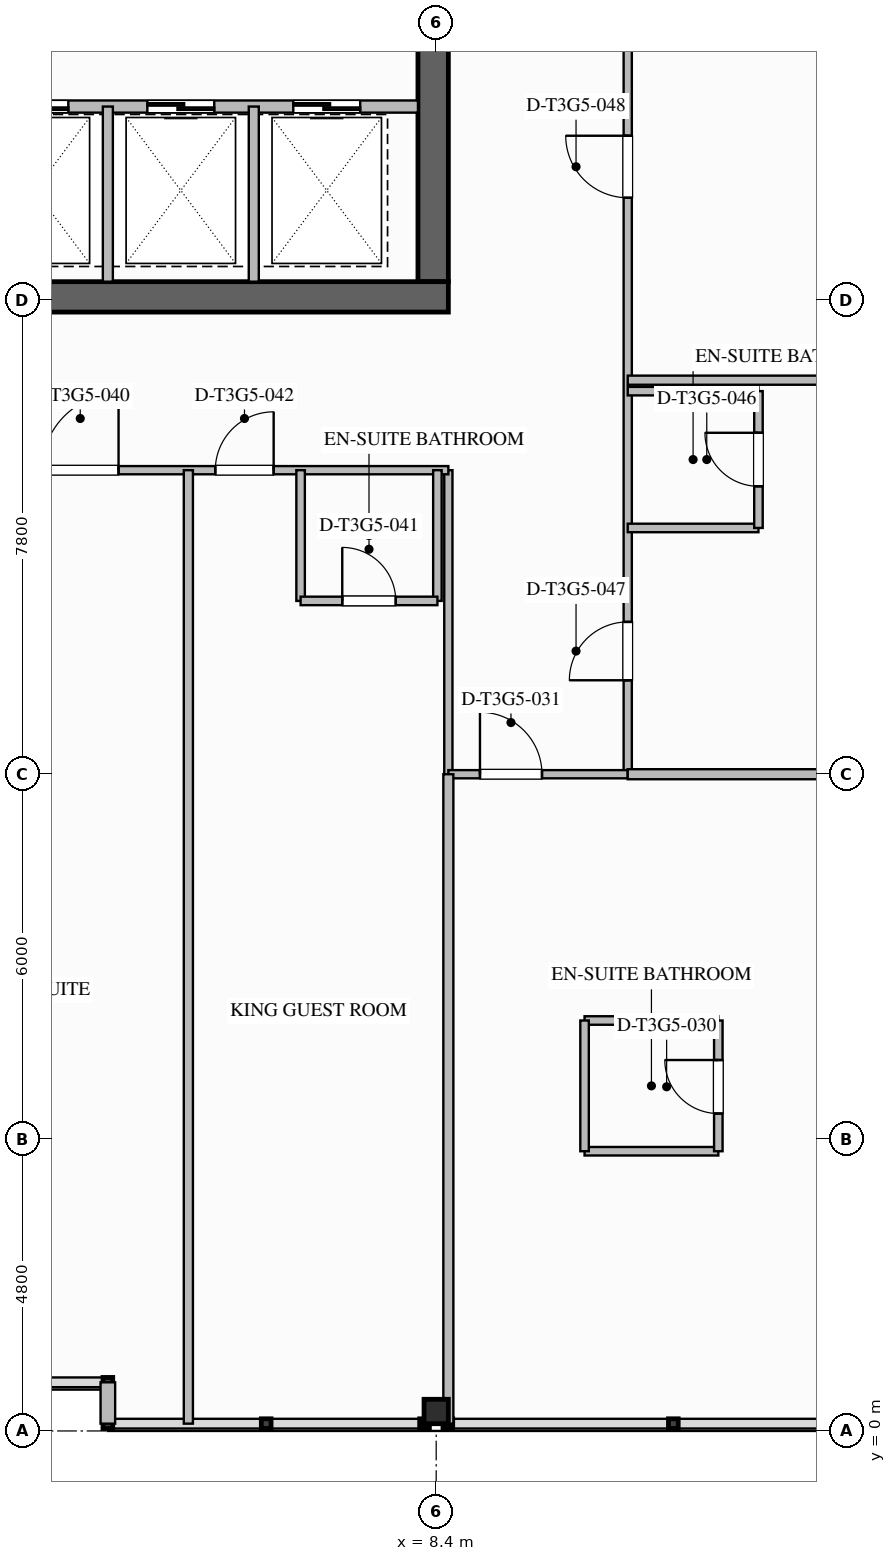
"""IFC4 building model, lengths in metres.
Left out: names, types, materials, properties, quantities, classifications, styles, units other than length and angle.
Written with IfcOpenShell. Run it as: python <this file> out.ifc"""

import sys

from ifc_helpers import new_model, si_unit, direction, frame, frame_2d, origin, origin_2d, place, context, subcontext, project, spatial, rectangle, i_section, extrude, element, fill, save


model = new_model("IFC4")
c1 = context("Model", 3, precision=1e-05, world=origin(), true_north=direction((0.0, 1.0)))
c2 = subcontext(c1, "Body", "Model", "MODEL_VIEW")
j1 = project(units=[si_unit("LENGTHUNIT", "METRE"), si_unit("PLANEANGLEUNIT", "RADIAN")], contexts=[c1])
p1 = place(None, origin())
s1 = spatial("IfcSite", under=j1, at=p1, CompositionType="ELEMENT")
p2 = place(p1, origin())
s2 = spatial("IfcBuilding", under=s1, at=p2, CompositionType="ELEMENT")
p3 = place(p2, frame((0.0, 0.0, 193.0)))
s3 = spatial("IfcBuildingStorey", under=s2, at=p3, CompositionType="ELEMENT", Elevation=193.0)
p4 = place(p3, frame((8.35, 35.1, 0.0), z_axis=(0.0, 0.0, 1.0), x_axis=(0.0, -1.0, 0.0)))
e1 = element("IfcWall", 1, at=p4, inside=s3, PredefinedType="SHEAR", context=c2, shape_type="SweptSolid", body=[
    extrude(rectangle(XDim=16.2, YDim=0.5, at=frame_2d((8.1, 0.0))), origin(), (0.0, 0.0, 1.0), 3.55),
])
p5 = place(p4, frame((3.08, 0.0, 0.0)))
e2 = element("IfcOpeningElement", 2, at=p5, cuts=e1, PredefinedType="OPENING", context=c2, shape_type="SweptSolid", body=[
    extrude(rectangle(XDim=1.12, YDim=2.1, at=frame_2d((0.56, 1.05))), frame((0.0, 0.26, 0.0), z_axis=(0.0, -1.0, 0.0), x_axis=(1.0, 0.0, 0.0)), (0.0, 0.0, 1.0), 0.52),
])
p6 = place(p4, frame((10.62, 0.0, 0.0)))
e3 = element("IfcOpeningElement", 3, at=p6, cuts=e1, PredefinedType="OPENING", context=c2, shape_type="SweptSolid", body=[
    extrude(rectangle(XDim=1.08, YDim=2.04, at=frame_2d((0.54, 1.02))), frame((0.0, 0.26, 0.0), z_axis=(0.0, -1.0, 0.0), x_axis=(1.0, 0.0, 0.0)), (0.0, 0.0, 1.0), 0.52),
])
p7 = place(p3, frame((8.6, 18.65, 0.0), z_axis=(0.0, 0.0, 1.0), x_axis=(-1.0, 0.0, 0.0)))
e4 = element("IfcWall", 4, at=p7, inside=s3, PredefinedType="SHEAR", context=c2, shape_type="SweptSolid", body=[
    extrude(rectangle(XDim=17.2, YDim=0.5, at=frame_2d((8.6, 0.0))), origin(), (0.0, 0.0, 1.0), 3.55),
])
p8 = place(p3, frame((8.4, 0.32, 0.0), z_axis=(0.0, 0.0, 1.0), x_axis=(0.0, 1.0, 0.0)))
e5 = element("IfcColumn", 5, at=p8, inside=s3, PredefinedType="COLUMN", context=c2, shape_type="SweptSolid", body=[
    extrude(i_section(OverallWidth=0.401, OverallDepth=0.399, WebThickness=0.025, FlangeThickness=0.04, FilletRadius=0.025, at=origin_2d()), origin(), (0.0, 0.0, 1.0), 3.547),
])
p9 = place(p3, frame((3.0, 0.12, 0.0), z_axis=(0.0, 0.0, 1.0), x_axis=(0.0, 1.0, 0.0)))
e6 = element("IfcWall", 6, at=p9, inside=s3, PredefinedType="STANDARD", context=c2, shape_type="SweptSolid", body=[
    extrude(rectangle(XDim=0.68, YDim=0.24, at=frame_2d((0.34, 0.0))), origin(), (0.0, 0.0, 1.0), 3.29),
])
p10 = place(p3, frame((8.1, 21.78, 0.0), z_axis=(0.0, 0.0, 1.0), x_axis=(-1.0, 0.0, 0.0)))
e7 = element("IfcWall", 7, at=p10, inside=s3, PredefinedType="SOLIDWALL", context=c2, shape_type="SweptSolid", body=[
    extrude(rectangle(XDim=7.55, YDim=0.2, at=frame_2d((3.775, 0.0))), origin(), (0.0, 0.0, 1.0), 3.29),
])
p11 = place(p10, frame((5.75, 0.0, 0.0)))
e8 = element("IfcOpeningElement", 8, at=p11, cuts=e7, PredefinedType="OPENING", context=c2, shape_type="SweptSolid", body=[
    extrude(rectangle(XDim=1.1, YDim=2.2, at=frame_2d((0.55, 1.1))), frame((0.0, 0.11, 0.0), z_axis=(0.0, -1.0, 0.0), x_axis=(1.0, 0.0, 0.0)), (0.0, 0.0, 1.0), 0.22),
])
p12 = place(p10, frame((3.35, 0.0, 0.0)))
e9 = element("IfcOpeningElement", 9, at=p12, cuts=e7, PredefinedType="OPENING", context=c2, shape_type="SweptSolid", body=[
    extrude(rectangle(XDim=1.1, YDim=2.2, at=frame_2d((0.55, 1.1))), frame((0.0, 0.11, 0.0), z_axis=(0.0, -1.0, 0.0), x_axis=(1.0, 0.0, 0.0)), (0.0, 0.0, 1.0), 0.22),
])
p13 = place(p10, frame((0.95, 0.0, 0.0)))
e10 = element("IfcOpeningElement", 10, at=p13, cuts=e7, PredefinedType="OPENING", context=c2, shape_type="SweptSolid", body=[
    extrude(rectangle(XDim=1.1, YDim=2.2, at=frame_2d((0.55, 1.1))), frame((0.0, 0.11, 0.0), z_axis=(0.0, -1.0, 0.0), x_axis=(1.0, 0.0, 0.0)), (0.0, 0.0, 1.0), 0.22),
])
for number, where, z_axis, x_axis in (
    (11, (3.0, 18.9, 0.0), (0.0, 0.0, 1.0), (0.0, 1.0, 0.0)),
    (12, (5.4, 18.9, 0.0), (0.0, 0.0, 1.0), (0.0, 1.0, 0.0)),
):
    element("IfcWall", number, at=place(p3, frame(where, z_axis=z_axis, x_axis=x_axis)), inside=s3, PredefinedType="PARTITIONING", context=c2, shape_type="SweptSolid", body=[
        extrude(rectangle(XDim=2.88, YDim=0.165, at=frame_2d((1.44, 0.0))), origin(), (0.0, 0.0, 1.0), 3.29),
    ])
p14 = place(p3, frame((8.6, 10.8, 0.0), z_axis=(0.0, 0.0, 1.0), x_axis=(0.0, 1.0, 0.0)))
e13 = element("IfcWall", 13, at=p14, inside=s3, PredefinedType="PARTITIONING", context=c2, shape_type="SweptSolid", body=[
    extrude(rectangle(XDim=5.0, YDim=0.135, at=frame_2d((2.5, 0.0))), origin(), (0.0, 0.0, 1.0), 2.667),
])
p15 = place(p3, frame((-16.2, 15.8, 0.0), z_axis=(0.0, 0.0, 1.0), x_axis=(1.0, 0.0, 0.0)))
e14 = element("IfcWall", 14, at=p15, inside=s3, PredefinedType="PARTITIONING", context=c2, shape_type="SweptSolid", body=[
    extrude(rectangle(XDim=24.8, YDim=0.135, at=frame_2d((12.4, 0.0))), origin(), (0.0, 0.0, 1.0), 3.29),
])
p16 = place(p15, frame((0.355, 0.0, 0.0)))
e15 = element("IfcOpeningElement", 15, at=p16, cuts=e14, PredefinedType="OPENING", context=c2, shape_type="SweptSolid", body=[
    extrude(rectangle(XDim=0.96, YDim=2.15, at=frame_2d((0.48, 1.075))), frame((0.0, 0.077, 0.0), z_axis=(0.0, -1.0, 0.0), x_axis=(1.0, 0.0, 0.0)), (0.0, 0.0, 1.0), 0.155),
])
p17 = place(p15, frame((7.766, 0.0, 0.0)))
e16 = element("IfcOpeningElement", 16, at=p17, cuts=e14, PredefinedType="OPENING", context=c2, shape_type="SweptSolid", body=[
    extrude(rectangle(XDim=1.26, YDim=2.2, at=frame_2d((0.63, 1.1))), frame((0.0, 0.077, 0.0), z_axis=(0.0, -1.0, 0.0), x_axis=(1.0, 0.0, 0.0)), (0.0, 0.0, 1.0), 0.155),
])
p18 = place(p15, frame((11.89, 0.0, 0.0)))
e17 = element("IfcOpeningElement", 17, at=p18, cuts=e14, PredefinedType="OPENING", context=c2, shape_type="SweptSolid", body=[
    extrude(rectangle(XDim=1.02, YDim=2.15, at=frame_2d((0.51, 1.075))), frame((0.0, 0.077, 0.0), z_axis=(0.0, -1.0, 0.0), x_axis=(1.0, 0.0, 0.0)), (0.0, 0.0, 1.0), 0.155),
])
p19 = place(p15, frame((18.116, 0.0, 0.0)))
e18 = element("IfcOpeningElement", 18, at=p19, cuts=e14, PredefinedType="OPENING", context=c2, shape_type="SweptSolid", body=[
    extrude(rectangle(XDim=1.26, YDim=2.2, at=frame_2d((0.63, 1.1))), frame((0.0, 0.077, 0.0), z_axis=(0.0, -1.0, 0.0), x_axis=(1.0, 0.0, 0.0)), (0.0, 0.0, 1.0), 0.155),
])
p20 = place(p15, frame((20.967, 0.0, 0.0)))
e19 = element("IfcOpeningElement", 19, at=p20, cuts=e14, PredefinedType="OPENING", context=c2, shape_type="SweptSolid", body=[
    extrude(rectangle(XDim=0.96, YDim=2.15, at=frame_2d((0.48, 1.075))), frame((0.0, 0.077, 0.0), z_axis=(0.0, -1.0, 0.0), x_axis=(1.0, 0.0, 0.0)), (0.0, 0.0, 1.0), 0.155),
])
p21 = place(p3, frame((11.55, 10.8, 0.0), z_axis=(0.0, 0.0, 1.0), x_axis=(0.0, 1.0, 0.0)))
e20 = element("IfcWall", 20, at=p21, inside=s3, PredefinedType="PARTITIONING", context=c2, shape_type="SweptSolid", body=[
    extrude(rectangle(XDim=32.4, YDim=0.135, at=frame_2d((16.2, 0.0))), origin(), (0.0, 0.0, 1.0), 3.29),
])
p22 = place(p21, frame((1.545, 0.0, 0.0)))
e21 = element("IfcOpeningElement", 21, at=p22, cuts=e20, PredefinedType="OPENING", context=c2, shape_type="SweptSolid", body=[
    extrude(rectangle(XDim=0.96, YDim=2.15, at=frame_2d((0.48, 1.075))), frame((0.0, 0.077, 0.0), z_axis=(0.0, -1.0, 0.0), x_axis=(1.0, 0.0, 0.0)), (0.0, 0.0, 1.0), 0.155),
])
p23 = place(p21, frame((9.48, 0.0, 0.0)))
e22 = element("IfcOpeningElement", 22, at=p23, cuts=e20, PredefinedType="OPENING", context=c2, shape_type="SweptSolid", body=[
    extrude(rectangle(XDim=1.02, YDim=2.15, at=frame_2d((0.51, 1.075))), frame((0.0, 0.077, 0.0), z_axis=(0.0, -1.0, 0.0), x_axis=(1.0, 0.0, 0.0)), (0.0, 0.0, 1.0), 0.155),
])
p24 = place(p21, frame((14.445, 0.0, 0.0)))
e23 = element("IfcOpeningElement", 23, at=p24, cuts=e20, PredefinedType="OPENING", context=c2, shape_type="SweptSolid", body=[
    extrude(rectangle(XDim=0.96, YDim=2.15, at=frame_2d((0.48, 1.075))), frame((0.0, 0.077, 0.0), z_axis=(0.0, -1.0, 0.0), x_axis=(1.0, 0.0, 0.0)), (0.0, 0.0, 1.0), 0.155),
])
p25 = place(p21, frame((21.3, 0.0, 0.0)))
e24 = element("IfcOpeningElement", 24, at=p25, cuts=e20, PredefinedType="OPENING", context=c2, shape_type="SweptSolid", body=[
    extrude(rectangle(XDim=1.02, YDim=2.15, at=frame_2d((0.51, 1.075))), frame((0.0, 0.077, 0.0), z_axis=(0.0, -1.0, 0.0), x_axis=(1.0, 0.0, 0.0)), (0.0, 0.0, 1.0), 0.155),
])
p26 = place(p21, frame((26.925, 0.0, 0.0)))
e25 = element("IfcOpeningElement", 25, at=p26, cuts=e20, PredefinedType="OPENING", context=c2, shape_type="SweptSolid", body=[
    extrude(rectangle(XDim=0.96, YDim=2.15, at=frame_2d((0.48, 1.075))), frame((0.0, 0.077, 0.0), z_axis=(0.0, -1.0, 0.0), x_axis=(1.0, 0.0, 0.0)), (0.0, 0.0, 1.0), 0.155),
])
p27 = place(p3, frame((8.6, 10.8, 0.0), z_axis=(0.0, 0.0, 1.0), x_axis=(1.0, 0.0, 0.0)))
e26 = element("IfcWall", 26, at=p27, inside=s3, PredefinedType="PARTITIONING", context=c2, shape_type="SweptSolid", body=[
    extrude(rectangle(XDim=2.95, YDim=0.135, at=frame_2d((1.475, 0.0))), origin(), (0.0, 0.0, 1.0), 2.58),
])
p28 = place(p27, frame((0.52, 0.0, 0.0)))
e27 = element("IfcOpeningElement", 27, at=p28, cuts=e26, PredefinedType="OPENING", context=c2, shape_type="SweptSolid", body=[
    extrude(rectangle(XDim=1.02, YDim=2.15, at=frame_2d((0.51, 1.075))), frame((0.0, 0.077, 0.0), z_axis=(0.0, -1.0, 0.0), x_axis=(1.0, 0.0, 0.0)), (0.0, 0.0, 1.0), 0.155),
])
p29 = place(p3, frame((8.6, 0.12, 0.0), z_axis=(0.0, 0.0, 1.0), x_axis=(0.0, 1.0, 0.0)))
e28 = element("IfcWall", 28, at=p29, inside=s3, PredefinedType="PARTITIONING", context=c2, shape_type="SweptSolid", body=[
    extrude(rectangle(XDim=10.68, YDim=0.165, at=frame_2d((5.34, 0.0))), origin(), (0.0, 0.0, 1.0), 2.58),
])
p30 = place(p3, frame((11.55, 10.8, 0.0), z_axis=(0.0, 0.0, 1.0), x_axis=(1.0, 0.0, 0.0)))
e29 = element("IfcWall", 29, at=p30, inside=s3, PredefinedType="PARTITIONING", context=c2, shape_type="SweptSolid", body=[
    extrude(rectangle(XDim=10.53, YDim=0.165, at=frame_2d((5.265, 0.0))), origin(), (0.0, 0.0, 1.0), 2.58),
])
for number, where, z_axis, x_axis in (
    (30, (10.84, 4.6, 0.0), (0.0, 0.0, 1.0), (1.0, 0.0, 0.0)),
    (31, (10.84, 6.75, 0.0), (0.0, 0.0, 1.0), (1.0, 0.0, 0.0)),
):
    element("IfcWall", number, at=place(p3, frame(where, z_axis=z_axis, x_axis=x_axis)), inside=s3, PredefinedType="PLUMBINGWALL", context=c2, shape_type="SweptSolid", body=[
        extrude(rectangle(XDim=2.2, YDim=0.14, at=frame_2d((1.1, 0.0))), origin(), (0.0, 0.0, 1.0), 3.29),
    ])
p31 = place(p3, frame((10.84, 4.6, 0.0), z_axis=(0.0, 0.0, 1.0), x_axis=(0.0, 1.0, 0.0)))
e32 = element("IfcWall", 32, at=p31, inside=s3, PredefinedType="PLUMBINGWALL", context=c2, shape_type="SweptSolid", body=[
    extrude(rectangle(XDim=2.15, YDim=0.14, at=frame_2d((1.075, 0.0))), origin(), (0.0, 0.0, 1.0), 3.29),
])
p32 = place(p3, frame((13.04, 4.6, 0.0), z_axis=(0.0, 0.0, 1.0), x_axis=(0.0, 1.0, 0.0)))
e33 = element("IfcWall", 33, at=p32, inside=s3, PredefinedType="PLUMBINGWALL", context=c2, shape_type="SweptSolid", body=[
    extrude(rectangle(XDim=2.15, YDim=0.14, at=frame_2d((1.075, 0.0))), origin(), (0.0, 0.0, 1.0), 3.29),
])
p33 = place(p32, frame((0.62, 0.0, 0.0)))
e34 = element("IfcOpeningElement", 34, at=p33, cuts=e33, PredefinedType="OPENING", context=c2, shape_type="SweptSolid", body=[
    extrude(rectangle(XDim=0.88, YDim=2.1, at=frame_2d((0.44, 1.05))), frame((0.0, 0.08, 0.0), z_axis=(0.0, -1.0, 0.0), x_axis=(1.0, 0.0, 0.0)), (0.0, 0.0, 1.0), 0.16),
])
p34 = place(p3, frame((4.324, 0.12, 0.0), z_axis=(0.0, 0.0, 1.0), x_axis=(0.0, 1.0, 0.0)))
e35 = element("IfcWall", 35, at=p34, inside=s3, PredefinedType="PARTITIONING", context=c2, shape_type="SweptSolid", body=[
    extrude(rectangle(XDim=15.68, YDim=0.15, at=frame_2d((7.84, 0.0))), origin(), (0.0, 0.0, 1.0), 3.29),
])
p35 = place(p3, frame((6.17, 15.8, 0.0), z_axis=(0.0, 0.0, 1.0), x_axis=(0.0, -1.0, 0.0)))
e36 = element("IfcWall", 36, at=p35, inside=s3, PredefinedType="PLUMBINGWALL", context=c2, shape_type="SweptSolid", body=[
    extrude(rectangle(XDim=2.15, YDim=0.14, at=frame_2d((1.075, 0.0))), origin(), (0.0, 0.0, 1.0), 3.29),
])
p36 = place(p3, frame((8.42, 15.8, 0.0), z_axis=(0.0, 0.0, 1.0), x_axis=(0.0, -1.0, 0.0)))
e37 = element("IfcWall", 37, at=p36, inside=s3, PredefinedType="PLUMBINGWALL", context=c2, shape_type="SweptSolid", body=[
    extrude(rectangle(XDim=2.15, YDim=0.14, at=frame_2d((1.075, 0.0))), origin(), (0.0, 0.0, 1.0), 2.667),
])
p37 = place(p3, frame((6.17, 13.65, 0.0), z_axis=(0.0, 0.0, 1.0), x_axis=(1.0, 0.0, 0.0)))
e38 = element("IfcWall", 38, at=p37, inside=s3, PredefinedType="PLUMBINGWALL", context=c2, shape_type="SweptSolid", body=[
    extrude(rectangle(XDim=2.25, YDim=0.14, at=frame_2d((1.125, 0.0))), origin(), (0.0, 0.0, 1.0), 3.29),
])
p38 = place(p37, frame((0.685, 0.0, 0.0)))
e39 = element("IfcOpeningElement", 39, at=p38, cuts=e38, PredefinedType="OPENING", context=c2, shape_type="SweptSolid", body=[
    extrude(rectangle(XDim=0.88, YDim=2.1, at=frame_2d((0.44, 1.05))), frame((0.0, 0.08, 0.0), z_axis=(0.0, -1.0, 0.0), x_axis=(1.0, 0.0, 0.0)), (0.0, 0.0, 1.0), 0.16),
])
p39 = place(p3, frame((11.55, 14.85, 0.0), z_axis=(0.0, 0.0, 1.0), x_axis=(1.0, 0.0, 0.0)))
e40 = element("IfcWall", 40, at=p39, inside=s3, PredefinedType="PLUMBINGWALL", context=c2, shape_type="SweptSolid", body=[
    extrude(rectangle(XDim=2.15, YDim=0.14, at=frame_2d((1.075, 0.0))), origin(), (0.0, 0.0, 1.0), 2.868),
])
p40 = place(p3, frame((11.55, 17.1, 0.0), z_axis=(0.0, 0.0, 1.0), x_axis=(1.0, 0.0, 0.0)))
e41 = element("IfcWall", 41, at=p40, inside=s3, PredefinedType="PLUMBINGWALL", context=c2, shape_type="SweptSolid", body=[
    extrude(rectangle(XDim=2.15, YDim=0.14, at=frame_2d((1.075, 0.0))), origin(), (0.0, 0.0, 1.0), 3.29),
])
p41 = place(p3, frame((13.7, 14.85, 0.0), z_axis=(0.0, 0.0, 1.0), x_axis=(0.0, 1.0, 0.0)))
e42 = element("IfcWall", 42, at=p41, inside=s3, PredefinedType="PLUMBINGWALL", context=c2, shape_type="SweptSolid", body=[
    extrude(rectangle(XDim=2.25, YDim=0.14, at=frame_2d((1.125, 0.0))), origin(), (0.0, 0.0, 1.0), 3.29),
])
p42 = place(p41, frame((0.685, 0.0, 0.0)))
e43 = element("IfcOpeningElement", 43, at=p42, cuts=e42, PredefinedType="OPENING", context=c2, shape_type="SweptSolid", body=[
    extrude(rectangle(XDim=0.88, YDim=2.1, at=frame_2d((0.44, 1.05))), frame((0.0, 0.08, 0.0), z_axis=(0.0, -1.0, 0.0), x_axis=(1.0, 0.0, 0.0)), (0.0, 0.0, 1.0), 0.16),
])
p43 = place(p3, frame((11.55, 17.28, 0.0), z_axis=(0.0, 0.0, 1.0), x_axis=(1.0, 0.0, 0.0)))
e44 = element("IfcWall", 44, at=p43, inside=s3, PredefinedType="PARTITIONING", context=c2, shape_type="SweptSolid", body=[
    extrude(rectangle(XDim=10.53, YDim=0.15, at=frame_2d((5.265, 0.0))), origin(), (0.0, 0.0, 1.0), 3.29),
])
p44 = place(p11, origin())
e45 = element("IfcDoor", 45, at=p44, inside=s3, OperationType="SLIDING_TO_LEFT", PredefinedType="DOOR", context=c2, shape_type="SweptSolid", body=[
    extrude(rectangle(XDim=1.1, YDim=2.2, at=frame_2d((0.55, 1.1))), frame((0.0, 0.025, 0.0), z_axis=(0.0, -1.0, 0.0), x_axis=(1.0, 0.0, 0.0)), (0.0, 0.0, 1.0), 0.05),
])
fill(e8, e45)
p45 = place(p12, origin())
e46 = element("IfcDoor", 46, at=p45, inside=s3, OperationType="SLIDING_TO_LEFT", PredefinedType="DOOR", context=c2, shape_type="SweptSolid", body=[
    extrude(rectangle(XDim=1.1, YDim=2.2, at=frame_2d((0.55, 1.1))), frame((0.0, 0.025, 0.0), z_axis=(0.0, -1.0, 0.0), x_axis=(1.0, 0.0, 0.0)), (0.0, 0.0, 1.0), 0.05),
])
fill(e9, e46)
p46 = place(p13, origin())
e47 = element("IfcDoor", 47, at=p46, inside=s3, OperationType="SLIDING_TO_LEFT", PredefinedType="DOOR", context=c2, shape_type="SweptSolid", body=[
    extrude(rectangle(XDim=1.1, YDim=2.2, at=frame_2d((0.55, 1.1))), frame((0.0, 0.025, 0.0), z_axis=(0.0, -1.0, 0.0), x_axis=(1.0, 0.0, 0.0)), (0.0, 0.0, 1.0), 0.05),
])
fill(e10, e47)
p47 = place(p33, origin())
e48 = element("IfcDoor", 48, at=p47, inside=s3, OperationType="SINGLE_SWING_RIGHT", PredefinedType="DOOR", context=c2, shape_type="SweptSolid", body=[
    extrude(rectangle(XDim=0.88, YDim=2.1, at=frame_2d((0.44, 1.05))), frame((0.0, 0.025, 0.0), z_axis=(0.0, -1.0, 0.0), x_axis=(1.0, 0.0, 0.0)), (0.0, 0.0, 1.0), 0.05),
])
fill(e34, e48)
p48 = place(p28, origin())
e49 = element("IfcDoor", 49, at=p48, inside=s3, OperationType="SINGLE_SWING_LEFT", PredefinedType="DOOR", context=c2, shape_type="SweptSolid", body=[
    extrude(rectangle(XDim=1.02, YDim=2.15, at=frame_2d((0.51, 1.075))), frame((0.0, 0.025, 0.0), z_axis=(0.0, -1.0, 0.0), x_axis=(1.0, 0.0, 0.0)), (0.0, 0.0, 1.0), 0.05),
])
fill(e27, e49)
p49 = place(p19, origin())
e50 = element("IfcDoor", 50, at=p49, inside=s3, OperationType="SINGLE_SWING_RIGHT", PredefinedType="DOOR", context=c2, shape_type="SweptSolid", body=[
    extrude(rectangle(XDim=1.26, YDim=2.2, at=frame_2d((0.63, 1.1))), frame((0.0, 0.025, 0.0), z_axis=(0.0, -1.0, 0.0), x_axis=(1.0, 0.0, 0.0)), (0.0, 0.0, 1.0), 0.05),
])
fill(e18, e50)
p50 = place(p38, origin())
e51 = element("IfcDoor", 51, at=p50, inside=s3, OperationType="SINGLE_SWING_LEFT", PredefinedType="DOOR", context=c2, shape_type="SweptSolid", body=[
    extrude(rectangle(XDim=0.88, YDim=2.1, at=frame_2d((0.44, 1.05))), frame((0.0, 0.025, 0.0), z_axis=(0.0, -1.0, 0.0), x_axis=(1.0, 0.0, 0.0)), (0.0, 0.0, 1.0), 0.05),
])
fill(e39, e51)
p51 = place(p20, origin())
e52 = element("IfcDoor", 52, at=p51, inside=s3, OperationType="SINGLE_SWING_RIGHT", PredefinedType="DOOR", context=c2, shape_type="SweptSolid", body=[
    extrude(rectangle(XDim=0.96, YDim=2.15, at=frame_2d((0.48, 1.075))), frame((0.0, 0.025, 0.0), z_axis=(0.0, -1.0, 0.0), x_axis=(1.0, 0.0, 0.0)), (0.0, 0.0, 1.0), 0.05),
])
fill(e19, e52)
p52 = place(p42, origin())
e53 = element("IfcDoor", 53, at=p52, inside=s3, OperationType="SINGLE_SWING_RIGHT", PredefinedType="DOOR", context=c2, shape_type="SweptSolid", body=[
    extrude(rectangle(XDim=0.88, YDim=2.1, at=frame_2d((0.44, 1.05))), frame((0.0, 0.025, 0.0), z_axis=(0.0, -1.0, 0.0), x_axis=(1.0, 0.0, 0.0)), (0.0, 0.0, 1.0), 0.05),
])
fill(e43, e53)
p53 = place(p22, origin())
e54 = element("IfcDoor", 54, at=p53, inside=s3, OperationType="SINGLE_SWING_LEFT", PredefinedType="DOOR", context=c2, shape_type="SweptSolid", body=[
    extrude(rectangle(XDim=0.96, YDim=2.15, at=frame_2d((0.48, 1.075))), frame((0.0, 0.025, 0.0), z_axis=(0.0, -1.0, 0.0), x_axis=(1.0, 0.0, 0.0)), (0.0, 0.0, 1.0), 0.05),
])
fill(e21, e54)
p54 = place(p23, origin())
e55 = element("IfcDoor", 55, at=p54, inside=s3, OperationType="SINGLE_SWING_RIGHT", PredefinedType="DOOR", context=c2, shape_type="SweptSolid", body=[
    extrude(rectangle(XDim=1.02, YDim=2.15, at=frame_2d((0.51, 1.075))), frame((0.0, 0.025, 0.0), z_axis=(0.0, -1.0, 0.0), x_axis=(1.0, 0.0, 0.0)), (0.0, 0.0, 1.0), 0.05),
])
fill(e22, e55)
save(model, sys.argv[1])
